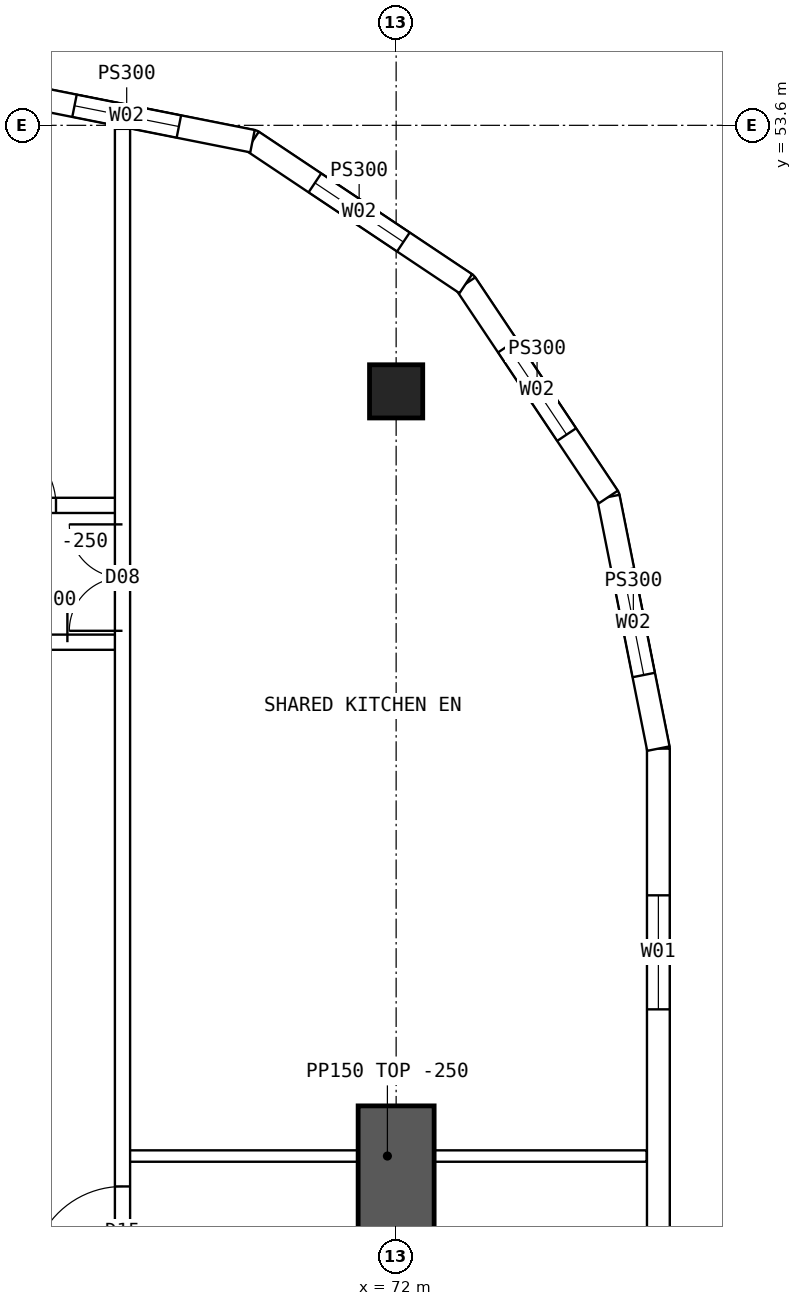
"""IFC4 building model, lengths in metres.
Left out: names, types, materials, properties, quantities, classifications, styles, units other than length and angle.
Written with IfcOpenShell. Run it as: python <this file> out.ifc"""

import sys

from ifc_helpers import new_model, si_unit, direction, frame, frame_2d, origin, origin_2d, place, context, subcontext, project, spatial, polyline, rectangle, hollow_rectangle, outline, extrude, element, fill, save


model = new_model("IFC4")
c1 = context("Model", 3, precision=1e-05, world=origin(), true_north=direction((0.0, 1.0)))
c2 = subcontext(c1, "Body", "Model", "MODEL_VIEW")
j1 = project(units=[si_unit("LENGTHUNIT", "METRE"), si_unit("PLANEANGLEUNIT", "RADIAN")], contexts=[c1])
p1 = place(None, origin())
s1 = spatial("IfcSite", under=j1, at=p1, CompositionType="ELEMENT")
p2 = place(p1, origin())
s2 = spatial("IfcBuilding", under=s1, at=p2, CompositionType="ELEMENT")
p3 = place(p2, frame((0.0, 0.0, 152.35)))
s3 = spatial("IfcBuildingStorey", under=s2, at=p3, CompositionType="ELEMENT", Elevation=152.35)
p4 = place(p3, frame((72.0, 50.1, 0.0), z_axis=(0.0, 0.0, 1.0), x_axis=(1.0, 0.0, 0.0)))
e1 = element("IfcColumn", 1, at=p4, inside=s3, PredefinedType="COLUMN", context=c2, shape_type="SweptSolid", body=[
    extrude(hollow_rectangle(XDim=0.7, YDim=0.7, WallThickness=0.07, at=origin_2d()), origin(), (0.0, 0.0, 1.0), 3.75),
])
p5 = place(p3, frame((72.0, 35.7, 0.0), z_axis=(0.0, 0.0, 1.0), x_axis=(0.0, 1.0, 0.0)))
e2 = element("IfcWall", 2, at=p5, inside=s3, PredefinedType="SHEAR", context=c2, shape_type="SweptSolid", body=[
    extrude(rectangle(XDim=5.0, YDim=1.0, at=frame_2d((2.5, 0.0))), origin(), (0.0, 0.0, 1.0), 3.75),
])
p6 = place(p3, frame((75.45, 18.6, 0.0), z_axis=(0.0, 0.0, 1.0), x_axis=(0.0, 1.0, 0.0)))
e3 = element("IfcWall", 3, at=p6, inside=s3, PredefinedType="SOLIDWALL", context=c2, shape_type="SweptSolid", body=[
    extrude(outline(polyline([(-0.015, -0.15), (26.815, -0.15), (26.785, 0.15), (0.015, 0.15), (-0.015, -0.15)])), origin(), (0.0, 0.0, 1.0), 3.5),
])
p7 = place(p6, frame((1.93, 0.0, 0.9)))
e4 = element("IfcOpeningElement", 4, at=p7, cuts=e3, PredefinedType="OPENING", context=c2, shape_type="SweptSolid", body=[
    extrude(rectangle(XDim=1.5, YDim=2.0, at=frame_2d((0.75, 1.0))), frame((0.0, 0.16, 0.0), z_axis=(0.0, -1.0, 0.0), x_axis=(1.0, 0.0, 0.0)), (0.0, 0.0, 1.0), 0.32),
])
p8 = place(p6, frame((7.29, 0.0, 0.9)))
e5 = element("IfcOpeningElement", 5, at=p8, cuts=e3, PredefinedType="OPENING", context=c2, shape_type="SweptSolid", body=[
    extrude(rectangle(XDim=1.5, YDim=2.0, at=frame_2d((0.75, 1.0))), frame((0.0, 0.16, 0.0), z_axis=(0.0, -1.0, 0.0), x_axis=(1.0, 0.0, 0.0)), (0.0, 0.0, 1.0), 0.32),
])
p9 = place(p6, frame((12.65, 0.0, 0.9)))
e6 = element("IfcOpeningElement", 6, at=p9, cuts=e3, PredefinedType="OPENING", context=c2, shape_type="SweptSolid", body=[
    extrude(rectangle(XDim=1.5, YDim=2.0, at=frame_2d((0.75, 1.0))), frame((0.0, 0.16, 0.0), z_axis=(0.0, -1.0, 0.0), x_axis=(1.0, 0.0, 0.0)), (0.0, 0.0, 1.0), 0.32),
])
p10 = place(p6, frame((18.01, 0.0, 0.9)))
e7 = element("IfcOpeningElement", 7, at=p10, cuts=e3, PredefinedType="OPENING", context=c2, shape_type="SweptSolid", body=[
    extrude(rectangle(XDim=1.5, YDim=2.0, at=frame_2d((0.75, 1.0))), frame((0.0, 0.16, 0.0), z_axis=(0.0, -1.0, 0.0), x_axis=(1.0, 0.0, 0.0)), (0.0, 0.0, 1.0), 0.32),
])
p11 = place(p6, frame((23.37, 0.0, 0.9)))
e8 = element("IfcOpeningElement", 8, at=p11, cuts=e3, PredefinedType="OPENING", context=c2, shape_type="SweptSolid", body=[
    extrude(rectangle(XDim=1.5, YDim=2.0, at=frame_2d((0.75, 1.0))), frame((0.0, 0.16, 0.0), z_axis=(0.0, -1.0, 0.0), x_axis=(1.0, 0.0, 0.0)), (0.0, 0.0, 1.0), 0.32),
])
p12 = place(p3, frame((75.45, 45.4, 0.0), z_axis=(0.0, 0.0, 1.0), x_axis=(-0.19508664885, 0.980786011034, 0.0)))
e9 = element("IfcWall", 9, at=p12, inside=s3, PredefinedType="SOLIDWALL", context=c2, shape_type="SweptSolid", body=[
    extrude(outline(polyline([(-0.015, -0.15), (3.405, -0.15), (3.345, 0.15), (0.015, 0.15), (-0.015, -0.15)])), origin(), (0.0, 0.0, 1.0), 3.5),
])
p13 = place(p12, frame((0.988, 0.0, 0.9)))
e10 = element("IfcOpeningElement", 10, at=p13, cuts=e9, PredefinedType="OPENING", context=c2, shape_type="SweptSolid", body=[
    extrude(rectangle(XDim=1.4, YDim=1.8, at=frame_2d((0.7, 0.9))), frame((0.0, 0.16, 0.0), z_axis=(0.0, -1.0, 0.0), x_axis=(1.0, 0.0, 0.0)), (0.0, 0.0, 1.0), 0.32),
])
p14 = place(p3, frame((74.792, 48.71, 0.0), z_axis=(0.0, 0.0, 1.0), x_axis=(-0.555534554399, 0.831493450887, 0.0)))
e11 = element("IfcWall", 11, at=p14, inside=s3, PredefinedType="SOLIDWALL", context=c2, shape_type="SweptSolid", body=[
    extrude(outline(polyline([(-0.03, -0.15), (3.405, -0.15), (3.345, 0.15), (0.03, 0.15), (-0.03, -0.15)])), origin(), (0.0, 0.0, 1.0), 3.5),
])
p15 = place(p14, frame((0.988, 0.0, 0.9)))
e12 = element("IfcOpeningElement", 12, at=p15, cuts=e11, PredefinedType="OPENING", context=c2, shape_type="SweptSolid", body=[
    extrude(rectangle(XDim=1.4, YDim=1.8, at=frame_2d((0.7, 0.9))), frame((0.0, 0.16, 0.0), z_axis=(0.0, -1.0, 0.0), x_axis=(1.0, 0.0, 0.0)), (0.0, 0.0, 1.0), 0.32),
])
p16 = place(p3, frame((72.917, 51.517, 0.0), z_axis=(0.0, 0.0, 1.0), x_axis=(-0.831493450887, 0.555534554399, 0.0)))
e13 = element("IfcWall", 13, at=p16, inside=s3, PredefinedType="SOLIDWALL", context=c2, shape_type="SweptSolid", body=[
    extrude(outline(polyline([(-0.03, -0.15), (3.405, -0.15), (3.345, 0.15), (0.03, 0.15), (-0.03, -0.15)])), origin(), (0.0, 0.0, 1.0), 3.5),
])
p17 = place(p16, frame((0.988, 0.0, 0.9)))
e14 = element("IfcOpeningElement", 14, at=p17, cuts=e13, PredefinedType="OPENING", context=c2, shape_type="SweptSolid", body=[
    extrude(rectangle(XDim=1.4, YDim=1.8, at=frame_2d((0.7, 0.9))), frame((0.0, 0.16, 0.0), z_axis=(0.0, -1.0, 0.0), x_axis=(1.0, 0.0, 0.0)), (0.0, 0.0, 1.0), 0.32),
])
p18 = place(p3, frame((70.11, 53.392, 0.0), z_axis=(0.0, 0.0, 1.0), x_axis=(-0.98078325777, 0.195100490205, 0.0)))
e15 = element("IfcWall", 15, at=p18, inside=s3, PredefinedType="SOLIDWALL", context=c2, shape_type="SweptSolid", body=[
    extrude(outline(polyline([(-0.03, -0.15), (3.405, -0.15), (3.345, 0.15), (0.03, 0.15), (-0.03, -0.15)])), origin(), (0.0, 0.0, 1.0), 3.5),
])
p19 = place(p18, frame((0.988, 0.0, 0.9)))
e16 = element("IfcOpeningElement", 16, at=p19, cuts=e15, PredefinedType="OPENING", context=c2, shape_type="SweptSolid", body=[
    extrude(rectangle(XDim=1.4, YDim=1.8, at=frame_2d((0.7, 0.9))), frame((0.0, 0.16, 0.0), z_axis=(0.0, -1.0, 0.0), x_axis=(1.0, 0.0, 0.0)), (0.0, 0.0, 1.0), 0.32),
])
p20 = place(p3, frame((66.425, 48.6, 0.0), z_axis=(0.0, 0.0, 1.0), x_axis=(1.0, 0.0, 0.0)))
e17 = element("IfcWall", 17, at=p20, inside=s3, PredefinedType="SOLIDWALL", context=c2, shape_type="SweptSolid", body=[
    extrude(rectangle(XDim=1.975, YDim=0.2, at=frame_2d((0.987, 0.0))), origin(), (0.0, 0.0, 1.0), 3.5),
])
p21 = place(p20, frame((0.2, 0.0, 0.0)))
e18 = element("IfcOpeningElement", 18, at=p21, cuts=e17, PredefinedType="OPENING", context=c2, shape_type="SweptSolid", body=[
    extrude(rectangle(XDim=0.9, YDim=2.1, at=frame_2d((0.45, 1.05))), frame((0.0, 0.11, 0.0), z_axis=(0.0, -1.0, 0.0), x_axis=(1.0, 0.0, 0.0)), (0.0, 0.0, 1.0), 0.22),
])
p22 = place(p3, frame((66.425, 46.8, 0.0), z_axis=(0.0, 0.0, 1.0), x_axis=(1.0, 0.0, 0.0)))
e19 = element("IfcWall", 19, at=p22, inside=s3, PredefinedType="SOLIDWALL", context=c2, shape_type="SweptSolid", body=[
    extrude(rectangle(XDim=1.975, YDim=0.2, at=frame_2d((0.987, 0.0))), origin(), (0.0, 0.0, 1.0), 3.5),
])
p23 = place(p22, frame((0.05, 0.0, 0.0)))
e20 = element("IfcOpeningElement", 20, at=p23, cuts=e19, PredefinedType="OPENING", context=c2, shape_type="SweptSolid", body=[
    extrude(rectangle(XDim=1.2, YDim=2.1, at=frame_2d((0.6, 1.05))), frame((0.0, 0.11, 0.0), z_axis=(0.0, -1.0, 0.0), x_axis=(1.0, 0.0, 0.0)), (0.0, 0.0, 1.0), 0.22),
])
p24 = place(p3, frame((68.4, 10.446, 0.0), z_axis=(0.0, 0.0, 1.0), x_axis=(0.0, 1.0, 0.0)))
e21 = element("IfcWall", 21, at=p24, inside=s3, PredefinedType="SOLIDWALL", context=c2, shape_type="SweptSolid", body=[
    extrude(rectangle(XDim=43.107, YDim=0.2, at=frame_2d((21.554, 0.0))), origin(), (0.0, 0.0, 1.0), 3.5),
])
p25 = place(p24, frame((27.994, 0.0, 0.0)))
e22 = element("IfcOpeningElement", 22, at=p25, cuts=e21, PredefinedType="OPENING", context=c2, shape_type="SweptSolid", body=[
    extrude(rectangle(XDim=1.2, YDim=2.1, at=frame_2d((0.6, 1.05))), frame((0.0, 0.11, 0.0), z_axis=(0.0, -1.0, 0.0), x_axis=(1.0, 0.0, 0.0)), (0.0, 0.0, 1.0), 0.22),
])
p26 = place(p24, frame((5.104, 0.0, 0.0)))
e23 = element("IfcOpeningElement", 23, at=p26, cuts=e21, PredefinedType="OPENING", context=c2, shape_type="SweptSolid", body=[
    extrude(rectangle(XDim=1.4, YDim=2.1, at=frame_2d((0.7, 1.05))), frame((0.0, 0.11, 0.0), z_axis=(0.0, -1.0, 0.0), x_axis=(1.0, 0.0, 0.0)), (0.0, 0.0, 1.0), 0.22),
])
p27 = place(p24, frame((36.504, 0.0, 0.0)))
e24 = element("IfcOpeningElement", 24, at=p27, cuts=e21, PredefinedType="OPENING", context=c2, shape_type="SweptSolid", body=[
    extrude(rectangle(XDim=1.4, YDim=2.1, at=frame_2d((0.7, 1.05))), frame((0.0, 0.11, 0.0), z_axis=(0.0, -1.0, 0.0), x_axis=(1.0, 0.0, 0.0)), (0.0, 0.0, 1.0), 0.22),
])
p28 = place(p3, frame((68.475, 40.04, 0.0), z_axis=(0.0, 0.0, 1.0), x_axis=(1.0, 0.0, 0.0)))
e25 = element("IfcWall", 25, at=p28, inside=s3, PredefinedType="PARTITIONING", context=c2, shape_type="SweptSolid", body=[
    extrude(rectangle(XDim=6.82, YDim=0.15, at=frame_2d((3.41, 0.0))), origin(), (0.0, 0.0, 1.0), 3.5),
])
p29 = place(p11, origin())
e26 = element("IfcWindow", 26, at=p29, inside=s3, PartitioningType="SINGLE_PANEL", PredefinedType="WINDOW", context=c2, shape_type="SweptSolid", body=[
    extrude(rectangle(XDim=1.5, YDim=2.0, at=frame_2d((0.75, 1.0))), frame((0.0, 0.03, 0.0), z_axis=(0.0, -1.0, 0.0), x_axis=(1.0, 0.0, 0.0)), (0.0, 0.0, 1.0), 0.06),
])
fill(e8, e26)
p30 = place(p13, origin())
e27 = element("IfcWindow", 27, at=p30, inside=s3, PartitioningType="SINGLE_PANEL", PredefinedType="WINDOW", context=c2, shape_type="SweptSolid", body=[
    extrude(rectangle(XDim=1.4, YDim=1.8, at=frame_2d((0.7, 0.9))), frame((0.0, 0.03, 0.0), z_axis=(0.0, -1.0, 0.0), x_axis=(1.0, 0.0, 0.0)), (0.0, 0.0, 1.0), 0.06),
])
fill(e10, e27)
p31 = place(p15, origin())
e28 = element("IfcWindow", 28, at=p31, inside=s3, PartitioningType="SINGLE_PANEL", PredefinedType="WINDOW", context=c2, shape_type="SweptSolid", body=[
    extrude(rectangle(XDim=1.4, YDim=1.8, at=frame_2d((0.7, 0.9))), frame((0.0, 0.03, 0.0), z_axis=(0.0, -1.0, 0.0), x_axis=(1.0, 0.0, 0.0)), (0.0, 0.0, 1.0), 0.06),
])
fill(e12, e28)
p32 = place(p17, origin())
e29 = element("IfcWindow", 29, at=p32, inside=s3, PartitioningType="SINGLE_PANEL", PredefinedType="WINDOW", context=c2, shape_type="SweptSolid", body=[
    extrude(rectangle(XDim=1.4, YDim=1.8, at=frame_2d((0.7, 0.9))), frame((0.0, 0.03, 0.0), z_axis=(0.0, -1.0, 0.0), x_axis=(1.0, 0.0, 0.0)), (0.0, 0.0, 1.0), 0.06),
])
fill(e14, e29)
p33 = place(p19, origin())
e30 = element("IfcWindow", 30, at=p33, inside=s3, PartitioningType="SINGLE_PANEL", PredefinedType="WINDOW", context=c2, shape_type="SweptSolid", body=[
    extrude(rectangle(XDim=1.4, YDim=1.8, at=frame_2d((0.7, 0.9))), frame((0.0, 0.03, 0.0), z_axis=(0.0, -1.0, 0.0), x_axis=(1.0, 0.0, 0.0)), (0.0, 0.0, 1.0), 0.06),
])
fill(e16, e30)
p34 = place(p23, origin())
e31 = element("IfcDoor", 31, at=p34, inside=s3, OperationType="DOUBLE_DOOR_SINGLE_SWING", PredefinedType="DOOR", context=c2, shape_type="SweptSolid", body=[
    extrude(rectangle(XDim=1.2, YDim=2.1, at=frame_2d((0.6, 1.05))), frame((0.0, 0.025, 0.0), z_axis=(0.0, -1.0, 0.0), x_axis=(1.0, 0.0, 0.0)), (0.0, 0.0, 1.0), 0.05),
])
fill(e20, e31)
p35 = place(p25, origin())
e32 = element("IfcDoor", 32, at=p35, inside=s3, OperationType="SINGLE_SWING_LEFT", PredefinedType="DOOR", context=c2, shape_type="SweptSolid", body=[
    extrude(rectangle(XDim=1.2, YDim=2.1, at=frame_2d((0.6, 1.05))), frame((0.0, 0.025, 0.0), z_axis=(0.0, -1.0, 0.0), x_axis=(1.0, 0.0, 0.0)), (0.0, 0.0, 1.0), 0.05),
])
fill(e22, e32)
p36 = place(p27, origin())
e33 = element("IfcDoor", 33, at=p36, inside=s3, OperationType="DOUBLE_DOOR_SINGLE_SWING", PredefinedType="DOOR", context=c2, shape_type="SweptSolid", body=[
    extrude(rectangle(XDim=1.4, YDim=2.1, at=frame_2d((0.7, 1.05))), frame((0.0, 0.025, 0.0), z_axis=(0.0, -1.0, 0.0), x_axis=(1.0, 0.0, 0.0)), (0.0, 0.0, 1.0), 0.05),
])
fill(e24, e33)
p37 = place(p21, origin())
e34 = element("IfcDoor", 34, at=p37, inside=s3, OperationType="SINGLE_SWING_LEFT", PredefinedType="DOOR", context=c2, shape_type="SweptSolid", body=[
    extrude(rectangle(XDim=0.9, YDim=2.1, at=frame_2d((0.45, 1.05))), frame((0.0, 0.025, 0.0), z_axis=(0.0, -1.0, 0.0), x_axis=(1.0, 0.0, 0.0)), (0.0, 0.0, 1.0), 0.05),
])
fill(e18, e34)
save(model, sys.argv[1])
